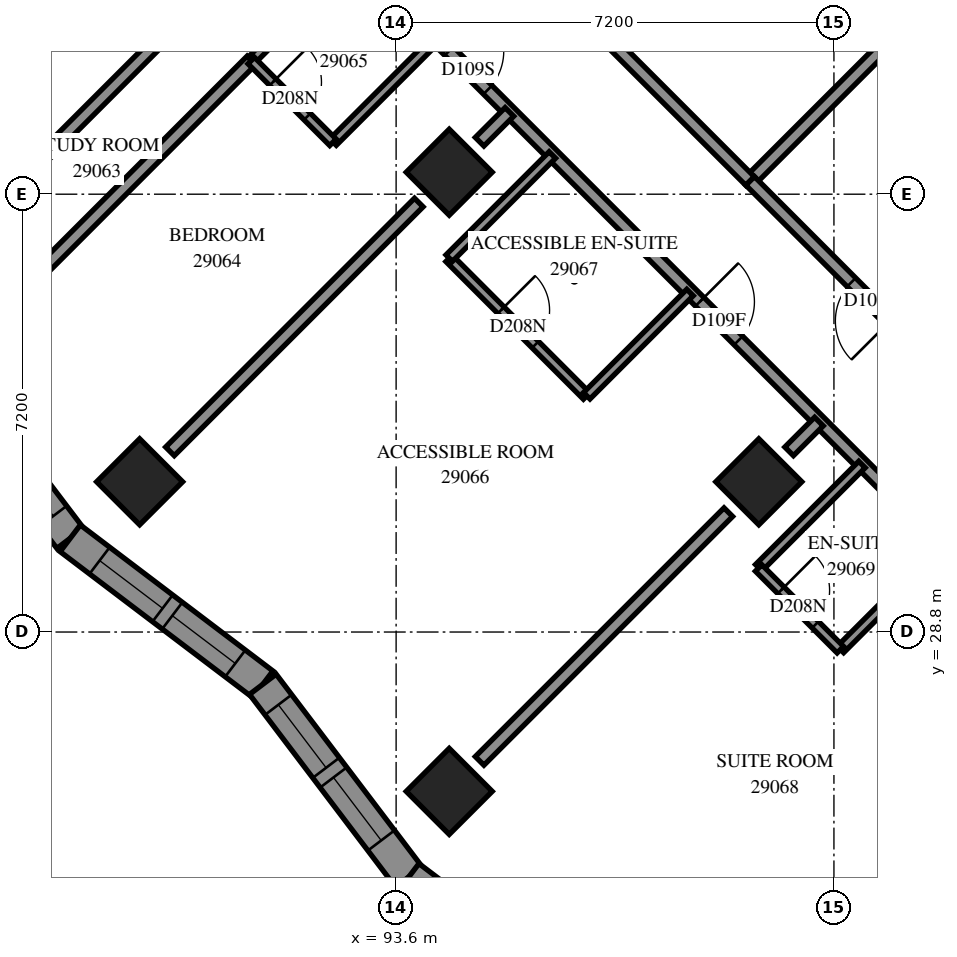
"""IFC4 building model, lengths in metres.
Left out: names, types, materials, properties, quantities, classifications, styles, units other than length and angle.
Written with IfcOpenShell. Run it as: python <this file> out.ifc"""

import sys

from ifc_helpers import new_model, si_unit, direction, frame, frame_2d, origin, origin_2d, place, context, subcontext, project, spatial, polyline, rectangle, outline, extrude, element, fill, save


model = new_model("IFC4")
c1 = context("Model", 3, precision=1e-05, world=origin(), true_north=direction((0.0, 1.0)))
c2 = subcontext(c1, "Body", "Model", "MODEL_VIEW")
j1 = project(units=[si_unit("LENGTHUNIT", "METRE"), si_unit("PLANEANGLEUNIT", "RADIAN")], contexts=[c1])
p1 = place(None, origin())
s1 = spatial("IfcSite", under=j1, at=p1, CompositionType="ELEMENT")
p2 = place(p1, origin())
s2 = spatial("IfcBuilding", under=s1, at=p2, CompositionType="ELEMENT")
p3 = place(p2, frame((0.0, 0.0, 108.4)))
s3 = spatial("IfcBuildingStorey", under=s2, at=p3, CompositionType="ELEMENT", Elevation=108.4)
for number, where, z_axis, x_axis in (
    (1, (94.474, 36.362, 0.0), (0.0, 0.0, 1.0), (0.707, -0.707, 0.0)),
    (2, (89.382, 31.271, 0.0), (0.0, 0.0, 1.0), (0.707, -0.707, 0.0)),
    (3, (99.565, 31.271, 0.0), (0.0, 0.0, 1.0), (0.707, -0.707, 0.0)),
    (4, (94.474, 26.18, 0.0), (0.0, 0.0, 1.0), (0.707, -0.707, 0.0)),
):
    element("IfcColumn", number, at=place(p3, frame(where, z_axis=z_axis, x_axis=x_axis)), inside=s3, PredefinedType="COLUMN", context=c2, shape_type="SweptSolid", body=[
        extrude(rectangle(XDim=1.0, YDim=1.0, at=origin_2d()), origin(), (0.0, 0.0, 1.0), 3.1),
    ])
p4 = place(p3, frame((85.84, 33.509, 0.0), z_axis=(0.0, 0.0, 1.0), x_axis=(0.6040819333, -0.7969222157, 0.0)))
e5 = element("IfcWall", 5, at=p4, inside=s3, PredefinedType="SOLIDWALL", context=c2, shape_type="SweptSolid", body=[
    extrude(outline(polyline([(0.038, -0.275), (4.013, -0.275), (3.937, 0.275), (-0.038, 0.275), (0.038, -0.275)])), origin(), (0.0, 0.0, 1.0), 3.1),
])
p5 = place(p4, frame((0.715, 0.0, 0.5)))
e6 = element("IfcOpeningElement", 6, at=p5, cuts=e5, PredefinedType="OPENING", context=c2, shape_type="SweptSolid", body=[
    extrude(rectangle(XDim=1.3, YDim=2.45, at=frame_2d((0.65, 1.225))), frame((0.0, 0.285, 0.0), z_axis=(0.0, -1.0, 0.0), x_axis=(1.0, 0.0, 0.0)), (0.0, 0.0, 1.0), 0.57),
])
p6 = place(p4, frame((2.215, 0.0, 0.5)))
e7 = element("IfcOpeningElement", 7, at=p6, cuts=e5, PredefinedType="OPENING", context=c2, shape_type="SweptSolid", body=[
    extrude(rectangle(XDim=1.3, YDim=2.45, at=frame_2d((0.65, 1.225))), frame((0.0, 0.285, 0.0), z_axis=(0.0, -1.0, 0.0), x_axis=(1.0, 0.0, 0.0)), (0.0, 0.0, 1.0), 0.57),
])
p7 = place(p3, frame((88.241, 30.341, 0.0), z_axis=(0.0, 0.0, 1.0), x_axis=(0.7969251465, -0.6040780669, 0.0)))
e8 = element("IfcWall", 8, at=p7, inside=s3, PredefinedType="SOLIDWALL", context=c2, shape_type="SweptSolid", body=[
    extrude(outline(polyline([(-0.038, -0.275), (3.937, -0.275), (4.013, 0.275), (0.038, 0.275), (-0.038, -0.275)])), origin(), (0.0, 0.0, 1.0), 3.1),
])
p8 = place(p7, frame((0.606, 0.0, 0.5)))
e9 = element("IfcOpeningElement", 9, at=p8, cuts=e8, PredefinedType="OPENING", context=c2, shape_type="SweptSolid", body=[
    extrude(rectangle(XDim=1.3, YDim=2.45, at=frame_2d((0.65, 1.225))), frame((0.0, 0.285, 0.0), z_axis=(0.0, -1.0, 0.0), x_axis=(1.0, 0.0, 0.0)), (0.0, 0.0, 1.0), 0.57),
])
p9 = place(p7, frame((2.106, 0.0, 0.5)))
e10 = element("IfcOpeningElement", 10, at=p9, cuts=e8, PredefinedType="OPENING", context=c2, shape_type="SweptSolid", body=[
    extrude(rectangle(XDim=1.3, YDim=2.45, at=frame_2d((0.65, 1.225))), frame((0.0, 0.285, 0.0), z_axis=(0.0, -1.0, 0.0), x_axis=(1.0, 0.0, 0.0)), (0.0, 0.0, 1.0), 0.57),
])
p10 = place(p3, frame((91.408, 27.94, 0.0), z_axis=(0.0, 0.0, 1.0), x_axis=(0.604094045, -0.7969130347, 0.0)))
e11 = element("IfcWall", 11, at=p10, inside=s3, PredefinedType="SOLIDWALL", context=c2, shape_type="SweptSolid", body=[
    extrude(outline(polyline([(0.038, -0.275), (4.013, -0.275), (3.937, 0.275), (-0.038, 0.275), (0.038, -0.275)])), origin(), (0.0, 0.0, 1.0), 3.1),
])
p11 = place(p10, frame((0.422, 0.0, 0.5)))
e12 = element("IfcOpeningElement", 12, at=p11, cuts=e11, PredefinedType="OPENING", context=c2, shape_type="SweptSolid", body=[
    extrude(rectangle(XDim=1.3, YDim=2.45, at=frame_2d((0.65, 1.225))), frame((0.0, 0.285, 0.0), z_axis=(0.0, -1.0, 0.0), x_axis=(1.0, 0.0, 0.0)), (0.0, 0.0, 1.0), 0.57),
])
p12 = place(p10, frame((1.923, 0.0, 0.5)))
e13 = element("IfcOpeningElement", 13, at=p12, cuts=e11, PredefinedType="OPENING", context=c2, shape_type="SweptSolid", body=[
    extrude(rectangle(XDim=1.3, YDim=2.45, at=frame_2d((0.65, 1.225))), frame((0.0, 0.285, 0.0), z_axis=(0.0, -1.0, 0.0), x_axis=(1.0, 0.0, 0.0)), (0.0, 0.0, 1.0), 0.57),
])
p13 = place(p3, frame((93.809, 24.773, 0.0), z_axis=(0.0, 0.0, 1.0), x_axis=(0.7969168783, -0.6040889745, 0.0)))
e14 = element("IfcWall", 14, at=p13, inside=s3, PredefinedType="SOLIDWALL", context=c2, shape_type="SweptSolid", body=[
    extrude(outline(polyline([(-0.038, -0.275), (3.937, -0.275), (4.054, 0.275), (0.038, 0.275), (-0.038, -0.275)])), origin(), (0.0, 0.0, 1.0), 3.1),
])
p14 = place(p13, frame((1.071, 0.0, 0.5)))
e15 = element("IfcOpeningElement", 15, at=p14, cuts=e14, PredefinedType="OPENING", context=c2, shape_type="SweptSolid", body=[
    extrude(rectangle(XDim=1.2, YDim=2.45, at=frame_2d((0.6, 1.225))), frame((0.0, 0.285, 0.0), z_axis=(0.0, -1.0, 0.0), x_axis=(1.0, 0.0, 0.0)), (0.0, 0.0, 1.0), 0.57),
])
p15 = place(p3, frame((92.004, 40.819, 0.0), z_axis=(0.0, 0.0, 1.0), x_axis=(0.7071067812, -0.7071067812, 0.0)))
e16 = element("IfcWall", 16, at=p15, inside=s3, PredefinedType="PARTITIONING", context=c2, shape_type="SweptSolid", body=[
    extrude(rectangle(XDim=19.298, YDim=0.2, at=frame_2d((9.649, 0.0))), origin(), (0.0, 0.0, 1.0), 3.1),
])
p16 = place(p15, frame((3.489, 0.0, 0.0)))
e17 = element("IfcOpeningElement", 17, at=p16, cuts=e16, PredefinedType="OPENING", context=c2, shape_type="SweptSolid", body=[
    extrude(rectangle(XDim=0.9, YDim=2.1, at=frame_2d((0.45, 1.05))), frame((0.0, 0.11, 0.0), z_axis=(0.0, -1.0, 0.0), x_axis=(1.0, 0.0, 0.0)), (0.0, 0.0, 1.0), 0.22),
])
p17 = place(p15, frame((9.319, 0.0, 0.0)))
e18 = element("IfcOpeningElement", 18, at=p17, cuts=e16, PredefinedType="OPENING", context=c2, shape_type="SweptSolid", body=[
    extrude(rectangle(XDim=0.9, YDim=2.1, at=frame_2d((0.45, 1.05))), frame((0.0, 0.11, 0.0), z_axis=(0.0, -1.0, 0.0), x_axis=(1.0, 0.0, 0.0)), (0.0, 0.0, 1.0), 0.22),
])
p18 = place(p15, frame((15.961, 0.0, 0.0)))
e19 = element("IfcOpeningElement", 19, at=p18, cuts=e16, PredefinedType="OPENING", context=c2, shape_type="SweptSolid", body=[
    extrude(rectangle(XDim=0.9, YDim=2.1, at=frame_2d((0.45, 1.05))), frame((0.0, 0.11, 0.0), z_axis=(0.0, -1.0, 0.0), x_axis=(1.0, 0.0, 0.0)), (0.0, 0.0, 1.0), 0.22),
])
p19 = place(p3, frame((99.423, 36.221, 0.0), z_axis=(0.0, 0.0, 1.0), x_axis=(0.7071067812, 0.7071067812, 0.0)))
e20 = element("IfcWall", 20, at=p19, inside=s3, PredefinedType="PARTITIONING", context=c2, shape_type="SweptSolid", body=[
    extrude(rectangle(XDim=12.125, YDim=0.2, at=frame_2d((6.062, 0.0))), origin(), (0.0, 0.0, 1.0), 3.1),
])
p20 = place(p3, frame((93.411, 42.227, 0.0), z_axis=(0.0, 0.0, 1.0), x_axis=(0.7071067812, -0.7071067812, 0.0)))
e21 = element("IfcWall", 21, at=p20, inside=s3, PredefinedType="PARTITIONING", context=c2, shape_type="SweptSolid", body=[
    extrude(rectangle(XDim=8.499, YDim=0.2, at=frame_2d((4.25, 0.0))), origin(), (0.0, 0.0, 1.0), 3.1),
])
p21 = place(p20, frame((3.672, 0.0, 0.0)))
e22 = element("IfcOpeningElement", 22, at=p21, cuts=e21, PredefinedType="OPENING", context=c2, shape_type="SweptSolid", body=[
    extrude(rectangle(XDim=1.0, YDim=2.1, at=frame_2d((0.5, 1.05))), frame((0.0, 0.11, 0.0), z_axis=(0.0, -1.0, 0.0), x_axis=(1.0, 0.0, 0.0)), (0.0, 0.0, 1.0), 0.22),
])
p22 = place(p3, frame((86.835, 35.655, 0.0), z_axis=(0.0, 0.0, 1.0), x_axis=(0.7071067812, 0.7071067812, 0.0)))
e23 = element("IfcWall", 23, at=p22, inside=s3, PredefinedType="PARTITIONING", context=c2, shape_type="SweptSolid", body=[
    extrude(rectangle(XDim=7.3, YDim=0.2, at=frame_2d((3.65, 0.0))), origin(), (0.0, 0.0, 1.0), 3.1),
])
p23 = place(p22, frame((6.046, 0.0, 0.0)))
e24 = element("IfcOpeningElement", 24, at=p23, cuts=e23, PredefinedType="OPENING", context=c2, shape_type="SweptSolid", body=[
    extrude(rectangle(XDim=1.0, YDim=2.1, at=frame_2d((0.5, 1.05))), frame((0.0, 0.11, 0.0), z_axis=(0.0, -1.0, 0.0), x_axis=(1.0, 0.0, 0.0)), (0.0, 0.0, 1.0), 0.22),
])
p24 = place(p3, frame((86.334, 33.312, 0.0), z_axis=(0.0, 0.0, 1.0), x_axis=(0.7069693124, 0.7072442232, 0.0)))
e25 = element("IfcWall", 25, at=p24, inside=s3, PredefinedType="PARTITIONING", context=c2, shape_type="SweptSolid", body=[
    extrude(rectangle(XDim=6.911, YDim=0.2, at=frame_2d((3.456, 0.0))), origin(), (0.0, 0.0, 1.0), 3.1),
])
p25 = place(p3, frame((89.881, 31.771, 0.0), z_axis=(0.0, 0.0, 1.0), x_axis=(0.7071067812, 0.7071067812, 0.0)))
e26 = element("IfcWall", 26, at=p25, inside=s3, PredefinedType="PARTITIONING", context=c2, shape_type="SweptSolid", body=[
    extrude(rectangle(XDim=5.787, YDim=0.2, at=frame_2d((2.893, 0.0))), origin(), (0.0, 0.0, 1.0), 3.1),
])
p26 = place(p3, frame((100.063, 21.589, 0.0), z_axis=(0.0, 0.0, 1.0), x_axis=(0.7071067812, 0.7071067812, 0.0)))
e27 = element("IfcWall", 27, at=p26, inside=s3, PredefinedType="PARTITIONING", context=c2, shape_type="SweptSolid", body=[
    extrude(rectangle(XDim=5.787, YDim=0.2, at=frame_2d((2.893, 0.0))), origin(), (0.0, 0.0, 1.0), 2.6),
])
p27 = place(p3, frame((94.973, 26.681, 0.0), z_axis=(0.0, 0.0, 1.0), x_axis=(0.7071067812, 0.7071067812, 0.0)))
e28 = element("IfcWall", 28, at=p27, inside=s3, PredefinedType="PARTITIONING", context=c2, shape_type="SweptSolid", body=[
    extrude(rectangle(XDim=5.784, YDim=0.2, at=frame_2d((2.892, 0.0))), origin(), (0.0, 0.0, 1.0), 3.1),
])
p28 = place(p3, frame((103.168, 32.47, 0.0), z_axis=(0.0, 0.0, 1.0), x_axis=(-0.7067858967, 0.7074275201, 0.0)))
e29 = element("IfcWall", 29, at=p28, inside=s3, PredefinedType="PARTITIONING", context=c2, shape_type="SweptSolid", body=[
    extrude(rectangle(XDim=5.299, YDim=0.2, at=frame_2d((2.65, 0.0))), origin(), (0.0, 0.0, 1.0), 3.1),
])
p29 = place(p28, frame((2.043, 0.0, 0.0)))
e30 = element("IfcOpeningElement", 30, at=p29, cuts=e29, PredefinedType="OPENING", context=c2, shape_type="SweptSolid", body=[
    extrude(rectangle(XDim=0.9, YDim=2.1, at=frame_2d((0.45, 1.05))), frame((0.0, 0.11, 0.0), z_axis=(0.0, -1.0, 0.0), x_axis=(1.0, 0.0, 0.0)), (0.0, 0.0, 1.0), 0.22),
])
p30 = place(p3, frame((94.471, 34.945, 0.0), z_axis=(0.0, 0.0, 1.0), x_axis=(0.7067942478, -0.7074191764, 0.0)))
e31 = element("IfcWall", 31, at=p30, inside=s3, PredefinedType="PARTITIONING", context=c2, shape_type="SweptSolid", body=[
    extrude(rectangle(XDim=3.2, YDim=0.15, at=frame_2d((1.6, 0.0))), origin(), (0.0, 0.0, 1.0), 3.1),
])
p31 = place(p30, frame((1.206, 0.0, 0.0)))
e32 = element("IfcOpeningElement", 32, at=p31, cuts=e31, PredefinedType="OPENING", context=c2, shape_type="SweptSolid", body=[
    extrude(rectangle(XDim=0.8, YDim=2.1, at=frame_2d((0.4, 1.05))), frame((0.0, 0.085, 0.0), z_axis=(0.0, -1.0, 0.0), x_axis=(1.0, 0.0, 0.0)), (0.0, 0.0, 1.0), 0.17),
])
for number, where, z_axis, x_axis in (
    (33, (92.563, 36.857, 0.0), (0.0, 0.0, 1.0), (0.707, 0.707, 0.0)),
    (34, (91.219, 38.201, 0.0), (0.0, 0.0, 1.0), (0.707, 0.707, 0.0)),
    (35, (96.735, 32.685, 0.0), (0.0, 0.0, 1.0), (0.707, 0.707, 0.0)),
    (36, (99.563, 29.857, 0.0), (0.0, 0.0, 1.0), (0.707, 0.707, 0.0)),
    (37, (100.907, 28.513, 0.0), (0.0, 0.0, 1.0), (0.707, 0.707, 0.0)),
):
    element("IfcWall", number, at=place(p3, frame(where, z_axis=z_axis, x_axis=x_axis)), inside=s3, PredefinedType="PARTITIONING", context=c2, shape_type="SweptSolid", body=[
        extrude(rectangle(XDim=2.401, YDim=0.15, at=frame_2d((1.201, 0.0))), origin(), (0.0, 0.0, 1.0), 3.1),
    ])
p32 = place(p3, frame((94.473, 34.949, 0.0), z_axis=(0.0, 0.0, 1.0), x_axis=(0.7071067812, 0.7071067812, 0.0)))
e38 = element("IfcWall", 38, at=p32, inside=s3, PredefinedType="PARTITIONING", context=c2, shape_type="SweptSolid", body=[
    extrude(rectangle(XDim=2.398, YDim=0.15, at=frame_2d((1.199, 0.0))), origin(), (0.0, 0.0, 1.0), 3.1),
])
p33 = place(p3, frame((99.561, 29.853, 0.0), z_axis=(0.0, 0.0, 1.0), x_axis=(0.7071067812, -0.7071067812, 0.0)))
e39 = element("IfcWall", 39, at=p33, inside=s3, PredefinedType="PARTITIONING", context=c2, shape_type="SweptSolid", body=[
    extrude(rectangle(XDim=1.901, YDim=0.15, at=frame_2d((0.95, 0.0))), origin(), (0.0, 0.0, 1.0), 3.1),
])
p34 = place(p33, frame((0.519, 0.0, 0.0)))
e40 = element("IfcOpeningElement", 40, at=p34, cuts=e39, PredefinedType="OPENING", context=c2, shape_type="SweptSolid", body=[
    extrude(rectangle(XDim=0.8, YDim=2.1, at=frame_2d((0.4, 1.05))), frame((0.0, 0.085, 0.0), z_axis=(0.0, -1.0, 0.0), x_axis=(1.0, 0.0, 0.0)), (0.0, 0.0, 1.0), 0.17),
])
p35 = place(p3, frame((91.217, 38.197, 0.0), z_axis=(0.0, 0.0, 1.0), x_axis=(0.7071067812, -0.7071067812, 0.0)))
e41 = element("IfcWall", 41, at=p35, inside=s3, PredefinedType="PARTITIONING", context=c2, shape_type="SweptSolid", body=[
    extrude(rectangle(XDim=1.901, YDim=0.15, at=frame_2d((0.95, 0.0))), origin(), (0.0, 0.0, 1.0), 3.1),
])
p36 = place(p35, frame((0.502, 0.0, 0.0)))
e42 = element("IfcOpeningElement", 42, at=p36, cuts=e41, PredefinedType="OPENING", context=c2, shape_type="SweptSolid", body=[
    extrude(rectangle(XDim=0.8, YDim=2.1, at=frame_2d((0.4, 1.05))), frame((0.0, 0.085, 0.0), z_axis=(0.0, -1.0, 0.0), x_axis=(1.0, 0.0, 0.0)), (0.0, 0.0, 1.0), 0.17),
])
for number, where, z_axis, x_axis in (
    (43, (94.973, 36.863, 0.0), (0.0, 0.0, 1.0), (0.707, 0.707, 0.0)),
    (44, (100.063, 31.771, 0.0), (0.0, 0.0, 1.0), (0.707, 0.707, 0.0)),
):
    element("IfcWall", number, at=place(p3, frame(where, z_axis=z_axis, x_axis=x_axis)), inside=s3, PredefinedType="PARTITIONING", context=c2, shape_type="SweptSolid", body=[
        extrude(rectangle(XDim=0.693, YDim=0.2, at=frame_2d((0.346, 0.0))), origin(), (0.0, 0.0, 1.0), 3.1),
    ])
p37 = place(p6, origin())
e45 = element("IfcWindow", 45, at=p37, inside=s3, PartitioningType="SINGLE_PANEL", PredefinedType="WINDOW", context=c2, shape_type="SweptSolid", body=[
    extrude(rectangle(XDim=1.3, YDim=2.45, at=frame_2d((0.65, 1.225))), frame((0.0, 0.155, 0.0), z_axis=(0.0, -1.0, 0.0), x_axis=(1.0, 0.0, 0.0)), (0.0, 0.0, 1.0), 0.06),
])
fill(e7, e45)
p38 = place(p8, origin())
e46 = element("IfcWindow", 46, at=p38, inside=s3, PartitioningType="SINGLE_PANEL", PredefinedType="WINDOW", context=c2, shape_type="SweptSolid", body=[
    extrude(rectangle(XDim=1.3, YDim=2.45, at=frame_2d((0.65, 1.225))), frame((0.0, 0.155, 0.0), z_axis=(0.0, -1.0, 0.0), x_axis=(1.0, 0.0, 0.0)), (0.0, 0.0, 1.0), 0.06),
])
fill(e9, e46)
p39 = place(p9, origin())
e47 = element("IfcWindow", 47, at=p39, inside=s3, PartitioningType="SINGLE_PANEL", PredefinedType="WINDOW", context=c2, shape_type="SweptSolid", body=[
    extrude(rectangle(XDim=1.3, YDim=2.45, at=frame_2d((0.65, 1.225))), frame((0.0, 0.155, 0.0), z_axis=(0.0, -1.0, 0.0), x_axis=(1.0, 0.0, 0.0)), (0.0, 0.0, 1.0), 0.06),
])
fill(e10, e47)
p40 = place(p11, origin())
e48 = element("IfcWindow", 48, at=p40, inside=s3, PartitioningType="SINGLE_PANEL", PredefinedType="WINDOW", context=c2, shape_type="SweptSolid", body=[
    extrude(rectangle(XDim=1.3, YDim=2.45, at=frame_2d((0.65, 1.225))), frame((0.0, 0.155, 0.0), z_axis=(0.0, -1.0, 0.0), x_axis=(1.0, 0.0, 0.0)), (0.0, 0.0, 1.0), 0.06),
])
fill(e12, e48)
p41 = place(p12, origin())
e49 = element("IfcWindow", 49, at=p41, inside=s3, PartitioningType="SINGLE_PANEL", PredefinedType="WINDOW", context=c2, shape_type="SweptSolid", body=[
    extrude(rectangle(XDim=1.3, YDim=2.45, at=frame_2d((0.65, 1.225))), frame((0.0, 0.155, 0.0), z_axis=(0.0, -1.0, 0.0), x_axis=(1.0, 0.0, 0.0)), (0.0, 0.0, 1.0), 0.06),
])
fill(e13, e49)
p42 = place(p29, origin())
e50 = element("IfcDoor", 50, at=p42, inside=s3, OperationType="SINGLE_SWING_RIGHT", PredefinedType="DOOR", context=c2, shape_type="SweptSolid", body=[
    extrude(rectangle(XDim=0.9, YDim=2.1, at=frame_2d((0.45, 1.05))), frame((0.0, 0.025, 0.0), z_axis=(0.0, -1.0, 0.0), x_axis=(1.0, 0.0, 0.0)), (0.0, 0.0, 1.0), 0.05),
])
fill(e30, e50)
p43 = place(p16, origin())
e51 = element("IfcDoor", 51, at=p43, inside=s3, OperationType="SINGLE_SWING_LEFT", PredefinedType="DOOR", context=c2, shape_type="SweptSolid", body=[
    extrude(rectangle(XDim=0.9, YDim=2.1, at=frame_2d((0.45, 1.05))), frame((0.0, 0.025, 0.0), z_axis=(0.0, -1.0, 0.0), x_axis=(1.0, 0.0, 0.0)), (0.0, 0.0, 1.0), 0.05),
])
fill(e17, e51)
p44 = place(p36, origin())
e52 = element("IfcDoor", 52, at=p44, inside=s3, OperationType="SINGLE_SWING_RIGHT", PredefinedType="DOOR", context=c2, shape_type="SweptSolid", body=[
    extrude(rectangle(XDim=0.8, YDim=2.1, at=frame_2d((0.4, 1.05))), frame((0.0, 0.025, 0.0), z_axis=(0.0, -1.0, 0.0), x_axis=(1.0, 0.0, 0.0)), (0.0, 0.0, 1.0), 0.05),
])
fill(e42, e52)
p45 = place(p17, origin())
e53 = element("IfcDoor", 53, at=p45, inside=s3, OperationType="SINGLE_SWING_RIGHT", PredefinedType="DOOR", context=c2, shape_type="SweptSolid", body=[
    extrude(rectangle(XDim=0.9, YDim=2.1, at=frame_2d((0.45, 1.05))), frame((0.0, 0.025, 0.0), z_axis=(0.0, -1.0, 0.0), x_axis=(1.0, 0.0, 0.0)), (0.0, 0.0, 1.0), 0.05),
])
fill(e18, e53)
p46 = place(p31, origin())
e54 = element("IfcDoor", 54, at=p46, inside=s3, OperationType="SINGLE_SWING_RIGHT", PredefinedType="DOOR", context=c2, shape_type="SweptSolid", body=[
    extrude(rectangle(XDim=0.8, YDim=2.1, at=frame_2d((0.4, 1.05))), frame((0.0, 0.025, 0.0), z_axis=(0.0, -1.0, 0.0), x_axis=(1.0, 0.0, 0.0)), (0.0, 0.0, 1.0), 0.05),
])
fill(e32, e54)
p47 = place(p34, origin())
e55 = element("IfcDoor", 55, at=p47, inside=s3, OperationType="SINGLE_SWING_RIGHT", PredefinedType="DOOR", context=c2, shape_type="SweptSolid", body=[
    extrude(rectangle(XDim=0.8, YDim=2.1, at=frame_2d((0.4, 1.05))), frame((0.0, 0.025, 0.0), z_axis=(0.0, -1.0, 0.0), x_axis=(1.0, 0.0, 0.0)), (0.0, 0.0, 1.0), 0.05),
])
fill(e40, e55)
save(model, sys.argv[1])
